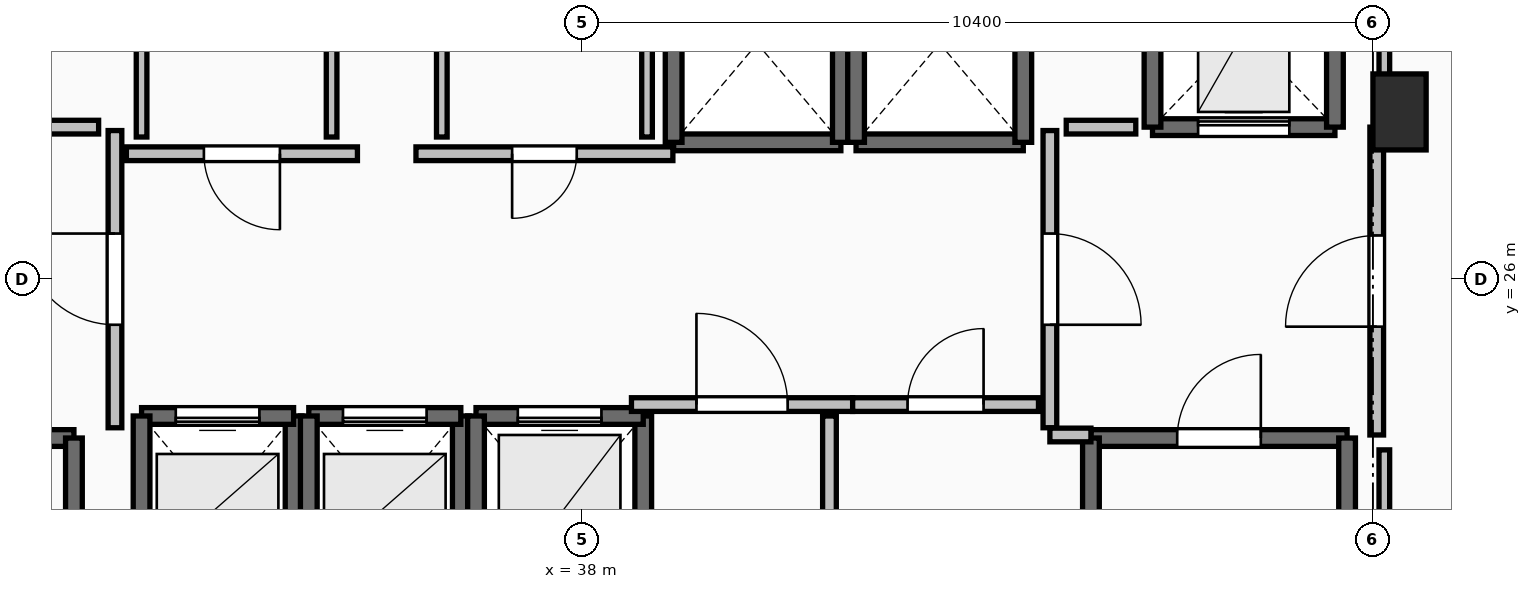
"""IFC4 building model, lengths in metres.
Left out: names, types, materials, properties, quantities, classifications, styles, units other than length and angle.
Written with IfcOpenShell. Run it as: python <this file> out.ifc"""

import sys

from ifc_helpers import new_model, si_unit, direction, frame, frame_2d, origin, origin_2d, place, context, subcontext, project, spatial, rectangle, extrude, element, fill, save


model = new_model("IFC4")
c1 = context("Model", 3, precision=1e-05, world=origin(), true_north=direction((0.0, 1.0)))
c2 = subcontext(c1, "Body", "Model", "MODEL_VIEW")
j1 = project(units=[si_unit("LENGTHUNIT", "METRE"), si_unit("PLANEANGLEUNIT", "RADIAN")], contexts=[c1])
p1 = place(None, origin())
s1 = spatial("IfcSite", under=j1, at=p1, CompositionType="ELEMENT")
p2 = place(p1, origin())
s2 = spatial("IfcBuilding", under=s1, at=p2, CompositionType="ELEMENT")
p3 = place(p2, frame((0.0, 0.0, 189.6)))
s3 = spatial("IfcBuildingStorey", under=s2, at=p3, CompositionType="ELEMENT", Elevation=189.6)
p4 = place(p3, frame((48.75, 28.2, 0.0), z_axis=(0.0, 0.0, 1.0), x_axis=(1.0, 0.0, 0.0)))
e1 = element("IfcColumn", 1, at=p4, inside=s3, PredefinedType="PILASTER", context=c2, shape_type="SweptSolid", body=[
    extrude(rectangle(XDim=0.7, YDim=1.0, at=origin_2d()), origin(), (0.0, 0.0, 1.0), 3.5),
])
p5 = place(p3, frame((27.94, 23.91, 0.0), z_axis=(0.0, 0.0, 1.0), x_axis=(1.0, 0.0, 0.0)))
e2 = element("IfcWall", 2, at=p5, inside=s3, PredefinedType="SOLIDWALL", context=c2, shape_type="SweptSolid", body=[
    extrude(rectangle(XDim=3.37, YDim=0.22, at=frame_2d((1.685, 0.0))), origin(), (0.0, 0.0, 1.0), 3.24),
])
p6 = place(p5, frame((1.135, 0.0, 0.0)))
e3 = element("IfcOpeningElement", 3, at=p6, cuts=e2, PredefinedType="OPENING", context=c2, shape_type="SweptSolid", body=[
    extrude(rectangle(XDim=1.1, YDim=2.15, at=frame_2d((0.55, 1.075))), frame((0.0, 0.125, 0.0), z_axis=(0.0, -1.0, 0.0), x_axis=(1.0, 0.0, 0.0)), (0.0, 0.0, 1.0), 0.25),
])
p7 = place(p3, frame((31.31, 23.91, 0.0), z_axis=(0.0, 0.0, 1.0), x_axis=(0.0, -1.0, 0.0)))
e4 = element("IfcWall", 4, at=p7, inside=s3, PredefinedType="SOLIDWALL", context=c2, shape_type="SweptSolid", body=[
    extrude(rectangle(XDim=7.42, YDim=0.22, at=frame_2d((3.71, 0.0))), origin(), (0.0, 0.0, 1.0), 3.24),
])
p8 = place(p3, frame((44.69, 23.91, 0.0), z_axis=(0.0, 0.0, 1.0), x_axis=(1.0, 0.0, 0.0)))
e5 = element("IfcWall", 5, at=p8, inside=s3, PredefinedType="SOLIDWALL", context=c2, shape_type="SweptSolid", body=[
    extrude(rectangle(XDim=3.37, YDim=0.22, at=frame_2d((1.685, 0.0))), origin(), (0.0, 0.0, 1.0), 3.24),
])
p9 = place(p8, frame((1.135, 0.0, 0.0)))
e6 = element("IfcOpeningElement", 6, at=p9, cuts=e5, PredefinedType="OPENING", context=c2, shape_type="SweptSolid", body=[
    extrude(rectangle(XDim=1.1, YDim=2.15, at=frame_2d((0.55, 1.075))), frame((0.0, 0.125, 0.0), z_axis=(0.0, -1.0, 0.0), x_axis=(1.0, 0.0, 0.0)), (0.0, 0.0, 1.0), 0.25),
])
for number, where, z_axis, x_axis in (
    (7, (48.06, 23.91, 0.0), (0.0, 0.0, 1.0), (0.0, -1.0, 0.0)),
    (8, (44.69, 16.49, 0.0), (0.0, 0.0, 1.0), (0.0, 1.0, 0.0)),
):
    element("IfcWall", number, at=place(p3, frame(where, z_axis=z_axis, x_axis=x_axis)), inside=s3, PredefinedType="SOLIDWALL", context=c2, shape_type="SweptSolid", body=[
        extrude(rectangle(XDim=7.42, YDim=0.22, at=frame_2d((3.71, 0.0))), origin(), (0.0, 0.0, 1.0), 3.24),
    ])
p10 = place(p3, frame((34.2, 21.8, 0.0), z_axis=(0.0, 0.0, 1.0), x_axis=(0.0, 1.0, 0.0)))
e9 = element("IfcWall", 9, at=p10, inside=s3, PredefinedType="SOLIDWALL", context=c2, shape_type="SweptSolid", body=[
    extrude(rectangle(XDim=2.4, YDim=0.22, at=frame_2d((1.2, 0.0))), origin(), (0.0, 0.0, 1.0), 3.24),
])
p11 = place(p3, frame((34.2, 24.2, 0.0), z_axis=(0.0, 0.0, 1.0), x_axis=(-1.0, 0.0, 0.0)))
e10 = element("IfcWall", 10, at=p11, inside=s3, PredefinedType="SOLIDWALL", context=c2, shape_type="SweptSolid", body=[
    extrude(rectangle(XDim=2.0, YDim=0.22, at=frame_2d((1.0, 0.0))), origin(), (0.0, 0.0, 1.0), 3.24),
])
p12 = place(p11, frame((0.45, 0.0, 0.0)))
e11 = element("IfcOpeningElement", 11, at=p12, cuts=e10, PredefinedType="OPENING", context=c2, shape_type="SweptSolid", body=[
    extrude(rectangle(XDim=1.1, YDim=2.2, at=frame_2d((0.55, 1.1))), frame((0.0, 0.125, 0.0), z_axis=(0.0, -1.0, 0.0), x_axis=(1.0, 0.0, 0.0)), (0.0, 0.0, 1.0), 0.25),
])
for number, where, z_axis, x_axis in (
    (12, (32.2, 24.2, 0.0), (0.0, 0.0, 1.0), (0.0, -1.0, 0.0)),
    (13, (36.4, 21.8, 0.0), (0.0, 0.0, 1.0), (0.0, 1.0, 0.0)),
):
    element("IfcWall", number, at=place(p3, frame(where, z_axis=z_axis, x_axis=x_axis)), inside=s3, PredefinedType="SOLIDWALL", context=c2, shape_type="SweptSolid", body=[
        extrude(rectangle(XDim=2.4, YDim=0.22, at=frame_2d((1.2, 0.0))), origin(), (0.0, 0.0, 1.0), 3.24),
    ])
p13 = place(p3, frame((36.4, 24.2, 0.0), z_axis=(0.0, 0.0, 1.0), x_axis=(-1.0, 0.0, 0.0)))
e14 = element("IfcWall", 14, at=p13, inside=s3, PredefinedType="SOLIDWALL", context=c2, shape_type="SweptSolid", body=[
    extrude(rectangle(XDim=2.0, YDim=0.22, at=frame_2d((1.0, 0.0))), origin(), (0.0, 0.0, 1.0), 3.24),
])
p14 = place(p13, frame((0.45, 0.0, 0.0)))
e15 = element("IfcOpeningElement", 15, at=p14, cuts=e14, PredefinedType="OPENING", context=c2, shape_type="SweptSolid", body=[
    extrude(rectangle(XDim=1.1, YDim=2.2, at=frame_2d((0.55, 1.1))), frame((0.0, 0.125, 0.0), z_axis=(0.0, -1.0, 0.0), x_axis=(1.0, 0.0, 0.0)), (0.0, 0.0, 1.0), 0.25),
])
p15 = place(p3, frame((34.4, 24.2, 0.0), z_axis=(0.0, 0.0, 1.0), x_axis=(0.0, -1.0, 0.0)))
e16 = element("IfcWall", 16, at=p15, inside=s3, PredefinedType="SOLIDWALL", context=c2, shape_type="SweptSolid", body=[
    extrude(rectangle(XDim=2.4, YDim=0.22, at=frame_2d((1.2, 0.0))), origin(), (0.0, 0.0, 1.0), 3.24),
])
p16 = place(p3, frame((38.8, 21.6, 0.0), z_axis=(0.0, 0.0, 1.0), x_axis=(0.0, 1.0, 0.0)))
e17 = element("IfcWall", 17, at=p16, inside=s3, PredefinedType="SOLIDWALL", context=c2, shape_type="SweptSolid", body=[
    extrude(rectangle(XDim=2.6, YDim=0.22, at=frame_2d((1.3, 0.0))), origin(), (0.0, 0.0, 1.0), 3.24),
])
p17 = place(p3, frame((38.8, 24.2, 0.0), z_axis=(0.0, 0.0, 1.0), x_axis=(-1.0, 0.0, 0.0)))
e18 = element("IfcWall", 18, at=p17, inside=s3, PredefinedType="SOLIDWALL", context=c2, shape_type="SweptSolid", body=[
    extrude(rectangle(XDim=2.2, YDim=0.22, at=frame_2d((1.1, 0.0))), origin(), (0.0, 0.0, 1.0), 3.24),
])
p18 = place(p17, frame((0.55, 0.0, 0.0)))
e19 = element("IfcOpeningElement", 19, at=p18, cuts=e18, PredefinedType="OPENING", context=c2, shape_type="SweptSolid", body=[
    extrude(rectangle(XDim=1.1, YDim=2.2, at=frame_2d((0.55, 1.1))), frame((0.0, 0.125, 0.0), z_axis=(0.0, -1.0, 0.0), x_axis=(1.0, 0.0, 0.0)), (0.0, 0.0, 1.0), 0.25),
])
p19 = place(p3, frame((36.6, 24.2, 0.0), z_axis=(0.0, 0.0, 1.0), x_axis=(0.0, -1.0, 0.0)))
e20 = element("IfcWall", 20, at=p19, inside=s3, PredefinedType="SOLIDWALL", context=c2, shape_type="SweptSolid", body=[
    extrude(rectangle(XDim=2.6, YDim=0.22, at=frame_2d((1.3, 0.0))), origin(), (0.0, 0.0, 1.0), 3.24),
])
p20 = place(p3, frame((39.2, 27.8, 0.0), z_axis=(0.0, 0.0, 1.0), x_axis=(1.0, 0.0, 0.0)))
e21 = element("IfcWall", 21, at=p20, inside=s3, PredefinedType="SOLIDWALL", context=c2, shape_type="SweptSolid", body=[
    extrude(rectangle(XDim=2.2, YDim=0.22, at=frame_2d((1.1, 0.0))), origin(), (0.0, 0.0, 1.0), 3.24),
])
for number, where, z_axis, x_axis in (
    (22, (41.4, 27.8, 0.0), (0.0, 0.0, 1.0), (0.0, 1.0, 0.0)),
    (23, (39.2, 30.4, 0.0), (0.0, 0.0, 1.0), (0.0, -1.0, 0.0)),
):
    element("IfcWall", number, at=place(p3, frame(where, z_axis=z_axis, x_axis=x_axis)), inside=s3, PredefinedType="SOLIDWALL", context=c2, shape_type="SweptSolid", body=[
        extrude(rectangle(XDim=2.6, YDim=0.22, at=frame_2d((1.3, 0.0))), origin(), (0.0, 0.0, 1.0), 3.24),
    ])
p21 = place(p3, frame((41.6, 27.8, 0.0), z_axis=(0.0, 0.0, 1.0), x_axis=(1.0, 0.0, 0.0)))
e24 = element("IfcWall", 24, at=p21, inside=s3, PredefinedType="SOLIDWALL", context=c2, shape_type="SweptSolid", body=[
    extrude(rectangle(XDim=2.2, YDim=0.22, at=frame_2d((1.1, 0.0))), origin(), (0.0, 0.0, 1.0), 3.24),
])
for number, where, z_axis, x_axis in (
    (25, (43.8, 27.8, 0.0), (0.0, 0.0, 1.0), (0.0, 1.0, 0.0)),
    (26, (41.6, 30.4, 0.0), (0.0, 0.0, 1.0), (0.0, -1.0, 0.0)),
):
    element("IfcWall", number, at=place(p3, frame(where, z_axis=z_axis, x_axis=x_axis)), inside=s3, PredefinedType="SOLIDWALL", context=c2, shape_type="SweptSolid", body=[
        extrude(rectangle(XDim=2.6, YDim=0.22, at=frame_2d((1.3, 0.0))), origin(), (0.0, 0.0, 1.0), 3.24),
    ])
p22 = place(p3, frame((45.5, 28.0, 0.0), z_axis=(0.0, 0.0, 1.0), x_axis=(1.0, 0.0, 0.0)))
e27 = element("IfcWall", 27, at=p22, inside=s3, PredefinedType="SHEAR", context=c2, shape_type="SweptSolid", body=[
    extrude(rectangle(XDim=2.4, YDim=0.22, at=frame_2d((1.2, 0.0))), origin(), (0.0, 0.0, 1.0), 3.24),
])
p23 = place(p22, frame((0.6, 0.0, 0.0)))
e28 = element("IfcOpeningElement", 28, at=p23, cuts=e27, PredefinedType="OPENING", context=c2, shape_type="SweptSolid", body=[
    extrude(rectangle(XDim=1.2, YDim=2.2, at=frame_2d((0.6, 1.1))), frame((0.0, 0.125, 0.0), z_axis=(0.0, -1.0, 0.0), x_axis=(1.0, 0.0, 0.0)), (0.0, 0.0, 1.0), 0.25),
])
for number, where, z_axis, x_axis in (
    (29, (47.9, 28.0, 0.0), (0.0, 0.0, 1.0), (0.0, 1.0, 0.0)),
    (30, (45.5, 30.5, 0.0), (0.0, 0.0, 1.0), (0.0, -1.0, 0.0)),
):
    element("IfcWall", number, at=place(p3, frame(where, z_axis=z_axis, x_axis=x_axis)), inside=s3, PredefinedType="SHEAR", context=c2, shape_type="SweptSolid", body=[
        extrude(rectangle(XDim=2.5, YDim=0.22, at=frame_2d((1.25, 0.0))), origin(), (0.0, 0.0, 1.0), 3.24),
    ])
p24 = place(p3, frame((31.85, 24.045, 0.0), z_axis=(0.0, 0.0, 1.0), x_axis=(0.0, 1.0, 0.0)))
e31 = element("IfcWall", 31, at=p24, inside=s3, PredefinedType="PARTITIONING", context=c2, shape_type="SweptSolid", body=[
    extrude(rectangle(XDim=3.91, YDim=0.18, at=frame_2d((1.955, 0.0))), origin(), (0.0, 0.0, 1.0), 3.24),
])
p25 = place(p24, frame((1.355, 0.0, 0.0)))
e32 = element("IfcOpeningElement", 32, at=p25, cuts=e31, PredefinedType="OPENING", context=c2, shape_type="SweptSolid", body=[
    extrude(rectangle(XDim=1.2, YDim=2.15, at=frame_2d((0.6, 1.075))), frame((0.0, 0.105, 0.0), z_axis=(0.0, -1.0, 0.0), x_axis=(1.0, 0.0, 0.0)), (0.0, 0.0, 1.0), 0.21),
])
p26 = place(p3, frame((44.15, 27.955, 0.0), z_axis=(0.0, 0.0, 1.0), x_axis=(0.0, -1.0, 0.0)))
e33 = element("IfcWall", 33, at=p26, inside=s3, PredefinedType="PARTITIONING", context=c2, shape_type="SweptSolid", body=[
    extrude(rectangle(XDim=3.91, YDim=0.18, at=frame_2d((1.955, 0.0))), origin(), (0.0, 0.0, 1.0), 3.24),
])
p27 = place(p26, frame((1.355, 0.0, 0.0)))
e34 = element("IfcOpeningElement", 34, at=p27, cuts=e33, PredefinedType="OPENING", context=c2, shape_type="SweptSolid", body=[
    extrude(rectangle(XDim=1.2, YDim=2.15, at=frame_2d((0.6, 1.075))), frame((0.0, 0.105, 0.0), z_axis=(0.0, -1.0, 0.0), x_axis=(1.0, 0.0, 0.0)), (0.0, 0.0, 1.0), 0.21),
])
p28 = place(p3, frame((44.15, 23.95, 0.0), z_axis=(0.0, 0.0, 1.0), x_axis=(1.0, 0.0, 0.0)))
e35 = element("IfcWall", 35, at=p28, inside=s3, PredefinedType="PARTITIONING", context=c2, shape_type="SweptSolid", body=[
    extrude(rectangle(XDim=0.54, YDim=0.18, at=frame_2d((0.27, 0.0))), origin(), (0.0, 0.0, 1.0), 3.24),
])
p29 = place(p3, frame((48.45, 23.95, 0.0), z_axis=(0.0, 0.0, 1.0), x_axis=(0.0, 1.0, 0.0)))
e36 = element("IfcWall", 36, at=p29, inside=s3, PredefinedType="PARTITIONING", context=c2, shape_type="SweptSolid", body=[
    extrude(rectangle(XDim=4.05, YDim=0.18, at=frame_2d((2.025, 0.0))), origin(), (0.0, 0.0, 1.0), 3.24),
])
p30 = place(p29, frame((1.425, 0.0, 0.0)))
e37 = element("IfcOpeningElement", 37, at=p30, cuts=e36, PredefinedType="OPENING", context=c2, shape_type="SweptSolid", body=[
    extrude(rectangle(XDim=1.2, YDim=2.15, at=frame_2d((0.6, 1.075))), frame((0.0, 0.105, 0.0), z_axis=(0.0, -1.0, 0.0), x_axis=(1.0, 0.0, 0.0)), (0.0, 0.0, 1.0), 0.21),
])
p31 = place(p3, frame((38.645, 24.35, 0.0), z_axis=(0.0, 0.0, 1.0), x_axis=(1.0, 0.0, 0.0)))
e38 = element("IfcWall", 38, at=p31, inside=s3, PredefinedType="PARTITIONING", context=c2, shape_type="SweptSolid", body=[
    extrude(rectangle(XDim=2.91, YDim=0.18, at=frame_2d((1.455, 0.0))), origin(), (0.0, 0.0, 1.0), 3.24),
])
p32 = place(p31, frame((0.855, 0.0, 0.0)))
e39 = element("IfcOpeningElement", 39, at=p32, cuts=e38, PredefinedType="OPENING", context=c2, shape_type="SweptSolid", body=[
    extrude(rectangle(XDim=1.2, YDim=2.15, at=frame_2d((0.6, 1.075))), frame((0.0, 0.105, 0.0), z_axis=(0.0, -1.0, 0.0), x_axis=(1.0, 0.0, 0.0)), (0.0, 0.0, 1.0), 0.21),
])
p33 = place(p3, frame((41.555, 24.35, 0.0), z_axis=(0.0, 0.0, 1.0), x_axis=(1.0, 0.0, 0.0)))
e40 = element("IfcWall", 40, at=p33, inside=s3, PredefinedType="PARTITIONING", context=c2, shape_type="SweptSolid", body=[
    extrude(rectangle(XDim=2.445, YDim=0.18, at=frame_2d((1.223, 0.0))), origin(), (0.0, 0.0, 1.0), 3.24),
])
p34 = place(p33, frame((0.722, 0.0, 0.0)))
e41 = element("IfcOpeningElement", 41, at=p34, cuts=e40, PredefinedType="OPENING", context=c2, shape_type="SweptSolid", body=[
    extrude(rectangle(XDim=1.0, YDim=2.15, at=frame_2d((0.5, 1.075))), frame((0.0, 0.105, 0.0), z_axis=(0.0, -1.0, 0.0), x_axis=(1.0, 0.0, 0.0)), (0.0, 0.0, 1.0), 0.21),
])
p35 = place(p3, frame((35.04, 27.65, 0.0), z_axis=(0.0, 0.0, 1.0), x_axis=(-1.0, 0.0, 0.0)))
e42 = element("IfcWall", 42, at=p35, inside=s3, PredefinedType="PARTITIONING", context=c2, shape_type="SweptSolid", body=[
    extrude(rectangle(XDim=3.04, YDim=0.18, at=frame_2d((1.52, 0.0))), origin(), (0.0, 0.0, 1.0), 3.24),
])
p36 = place(p35, frame((1.02, 0.0, 0.0)))
e43 = element("IfcOpeningElement", 43, at=p36, cuts=e42, PredefinedType="OPENING", context=c2, shape_type="SweptSolid", body=[
    extrude(rectangle(XDim=1.0, YDim=2.15, at=frame_2d((0.5, 1.075))), frame((0.0, 0.105, 0.0), z_axis=(0.0, -1.0, 0.0), x_axis=(1.0, 0.0, 0.0)), (0.0, 0.0, 1.0), 0.21),
])
p37 = place(p3, frame((39.19, 27.65, 0.0), z_axis=(0.0, 0.0, 1.0), x_axis=(-1.0, 0.0, 0.0)))
e44 = element("IfcWall", 44, at=p37, inside=s3, PredefinedType="PARTITIONING", context=c2, shape_type="SweptSolid", body=[
    extrude(rectangle(XDim=3.38, YDim=0.18, at=frame_2d((1.69, 0.0))), origin(), (0.0, 0.0, 1.0), 3.24),
])
p38 = place(p37, frame((1.265, 0.0, 0.0)))
e45 = element("IfcOpeningElement", 45, at=p38, cuts=e44, PredefinedType="OPENING", context=c2, shape_type="SweptSolid", body=[
    extrude(rectangle(XDim=0.85, YDim=2.1, at=frame_2d((0.425, 1.05))), frame((0.0, 0.105, 0.0), z_axis=(0.0, -1.0, 0.0), x_axis=(1.0, 0.0, 0.0)), (0.0, 0.0, 1.0), 0.21),
])
p39 = place(p3, frame((41.25, 20.305, 0.0), z_axis=(0.0, 0.0, 1.0), x_axis=(0.0, 1.0, 0.0)))
e46 = element("IfcWall", 46, at=p39, inside=s3, PredefinedType="PARTITIONING", context=c2, shape_type="SweptSolid", body=[
    extrude(rectangle(XDim=3.895, YDim=0.18, at=frame_2d((1.948, 0.0))), origin(), (0.0, 0.0, 1.0), 3.24),
])
p40 = place(p39, frame((1.448, 0.0, 0.0)))
e47 = element("IfcOpeningElement", 47, at=p40, cuts=e46, PredefinedType="OPENING", context=c2, shape_type="SweptSolid", body=[
    extrude(rectangle(XDim=1.0, YDim=2.15, at=frame_2d((0.5, 1.075))), frame((0.0, 0.105, 0.0), z_axis=(0.0, -1.0, 0.0), x_axis=(1.0, 0.0, 0.0)), (0.0, 0.0, 1.0), 0.21),
])
for number, where, z_axis, x_axis in (
    (48, (31.635, 28.0, 0.0), (0.0, 0.0, 1.0), (-1.0, 0.0, 0.0)),
    (49, (45.28, 28.0, 0.0), (0.0, 0.0, 1.0), (-1.0, 0.0, 0.0)),
):
    element("IfcWall", number, at=place(p3, frame(where, z_axis=z_axis, x_axis=x_axis)), inside=s3, PredefinedType="PARTITIONING", context=c2, shape_type="SweptSolid", body=[
        extrude(rectangle(XDim=0.915, YDim=0.18, at=frame_2d((0.458, 0.0))), origin(), (0.0, 0.0, 1.0), 3.24),
    ])
for number, where, z_axis, x_axis in (
    (50, (32.2, 30.26, 0.0), (0.0, 0.0, 1.0), (0.0, -1.0, 0.0)),
    (51, (34.7, 27.87, 0.0), (0.0, 0.0, 1.0), (0.0, 1.0, 0.0)),
    (52, (36.15, 30.26, 0.0), (0.0, 0.0, 1.0), (0.0, -1.0, 0.0)),
    (53, (38.85, 27.87, 0.0), (0.0, 0.0, 1.0), (0.0, 1.0, 0.0)),
):
    element("IfcWall", number, at=place(p3, frame(where, z_axis=z_axis, x_axis=x_axis)), inside=s3, PredefinedType="PARTITIONING", context=c2, shape_type="SweptSolid", body=[
        extrude(rectangle(XDim=2.39, YDim=0.14, at=frame_2d((1.195, 0.0))), origin(), (0.0, 0.0, 1.0), 3.24),
    ])
p41 = place(p3, frame((48.55, 28.196, 0.0), z_axis=(0.0, 0.0, 1.0), x_axis=(0.0, 1.0, 0.0)))
e54 = element("IfcWall", 54, at=p41, inside=s3, PredefinedType="PARTITIONING", context=c2, shape_type="SweptSolid", body=[
    extrude(rectangle(XDim=5.254, YDim=0.14, at=frame_2d((2.627, 0.0))), origin(), (0.0, 0.0, 1.0), 2.432),
])
p42 = place(p3, frame((48.55, 16.24, 0.0), z_axis=(0.0, 0.0, 1.0), x_axis=(0.0, 1.0, 0.0)))
e55 = element("IfcWall", 55, at=p42, inside=s3, PredefinedType="PARTITIONING", context=c2, shape_type="SweptSolid", body=[
    extrude(rectangle(XDim=7.514, YDim=0.14, at=frame_2d((3.757, 0.0))), origin(), (0.0, 0.0, 1.0), 2.432),
])
p43 = place(p9, origin())
e56 = element("IfcDoor", 56, at=p43, inside=s3, OperationType="SINGLE_SWING_RIGHT", PredefinedType="DOOR", context=c2, shape_type="SweptSolid", body=[
    extrude(rectangle(XDim=1.1, YDim=2.15, at=frame_2d((0.55, 1.075))), frame((0.0, 0.025, 0.0), z_axis=(0.0, -1.0, 0.0), x_axis=(1.0, 0.0, 0.0)), (0.0, 0.0, 1.0), 0.05),
])
fill(e6, e56)
p44 = place(p12, origin())
e57 = element("IfcDoor", 57, at=p44, inside=s3, OperationType="SLIDING_TO_LEFT", PredefinedType="DOOR", context=c2, shape_type="SweptSolid", body=[
    extrude(rectangle(XDim=1.1, YDim=2.2, at=frame_2d((0.55, 1.1))), frame((0.0, 0.025, 0.0), z_axis=(0.0, -1.0, 0.0), x_axis=(1.0, 0.0, 0.0)), (0.0, 0.0, 1.0), 0.05),
])
fill(e11, e57)
p45 = place(p14, origin())
e58 = element("IfcDoor", 58, at=p45, inside=s3, OperationType="SLIDING_TO_LEFT", PredefinedType="DOOR", context=c2, shape_type="SweptSolid", body=[
    extrude(rectangle(XDim=1.1, YDim=2.2, at=frame_2d((0.55, 1.1))), frame((0.0, 0.025, 0.0), z_axis=(0.0, -1.0, 0.0), x_axis=(1.0, 0.0, 0.0)), (0.0, 0.0, 1.0), 0.05),
])
fill(e15, e58)
p46 = place(p18, origin())
e59 = element("IfcDoor", 59, at=p46, inside=s3, OperationType="SLIDING_TO_LEFT", PredefinedType="DOOR", context=c2, shape_type="SweptSolid", body=[
    extrude(rectangle(XDim=1.1, YDim=2.2, at=frame_2d((0.55, 1.1))), frame((0.0, 0.025, 0.0), z_axis=(0.0, -1.0, 0.0), x_axis=(1.0, 0.0, 0.0)), (0.0, 0.0, 1.0), 0.05),
])
fill(e19, e59)
p47 = place(p23, origin())
e60 = element("IfcDoor", 60, at=p47, inside=s3, OperationType="SLIDING_TO_LEFT", PredefinedType="DOOR", context=c2, shape_type="SweptSolid", body=[
    extrude(rectangle(XDim=1.2, YDim=2.2, at=frame_2d((0.6, 1.1))), frame((0.0, 0.025, 0.0), z_axis=(0.0, -1.0, 0.0), x_axis=(1.0, 0.0, 0.0)), (0.0, 0.0, 1.0), 0.05),
])
fill(e28, e60)
p48 = place(p25, origin())
e61 = element("IfcDoor", 61, at=p48, inside=s3, OperationType="SINGLE_SWING_RIGHT", PredefinedType="DOOR", context=c2, shape_type="SweptSolid", body=[
    extrude(rectangle(XDim=1.2, YDim=2.15, at=frame_2d((0.6, 1.075))), frame((0.0, 0.025, 0.0), z_axis=(0.0, -1.0, 0.0), x_axis=(1.0, 0.0, 0.0)), (0.0, 0.0, 1.0), 0.05),
])
fill(e32, e61)
p49 = place(p27, origin())
e62 = element("IfcDoor", 62, at=p49, inside=s3, OperationType="SINGLE_SWING_RIGHT", PredefinedType="DOOR", context=c2, shape_type="SweptSolid", body=[
    extrude(rectangle(XDim=1.2, YDim=2.15, at=frame_2d((0.6, 1.075))), frame((0.0, 0.025, 0.0), z_axis=(0.0, -1.0, 0.0), x_axis=(1.0, 0.0, 0.0)), (0.0, 0.0, 1.0), 0.05),
])
fill(e34, e62)
p50 = place(p30, origin())
e63 = element("IfcDoor", 63, at=p50, inside=s3, OperationType="SINGLE_SWING_LEFT", PredefinedType="DOOR", context=c2, shape_type="SweptSolid", body=[
    extrude(rectangle(XDim=1.2, YDim=2.15, at=frame_2d((0.6, 1.075))), frame((0.0, 0.025, 0.0), z_axis=(0.0, -1.0, 0.0), x_axis=(1.0, 0.0, 0.0)), (0.0, 0.0, 1.0), 0.05),
])
fill(e37, e63)
p51 = place(p32, origin())
e64 = element("IfcDoor", 64, at=p51, inside=s3, OperationType="SINGLE_SWING_LEFT", PredefinedType="DOOR", context=c2, shape_type="SweptSolid", body=[
    extrude(rectangle(XDim=1.2, YDim=2.15, at=frame_2d((0.6, 1.075))), frame((0.0, 0.025, 0.0), z_axis=(0.0, -1.0, 0.0), x_axis=(1.0, 0.0, 0.0)), (0.0, 0.0, 1.0), 0.05),
])
fill(e39, e64)
p52 = place(p34, origin())
e65 = element("IfcDoor", 65, at=p52, inside=s3, OperationType="SINGLE_SWING_RIGHT", PredefinedType="DOOR", context=c2, shape_type="SweptSolid", body=[
    extrude(rectangle(XDim=1.0, YDim=2.15, at=frame_2d((0.5, 1.075))), frame((0.0, 0.025, 0.0), z_axis=(0.0, -1.0, 0.0), x_axis=(1.0, 0.0, 0.0)), (0.0, 0.0, 1.0), 0.05),
])
fill(e41, e65)
p53 = place(p36, origin())
e66 = element("IfcDoor", 66, at=p53, inside=s3, OperationType="SINGLE_SWING_LEFT", PredefinedType="DOOR", context=c2, shape_type="SweptSolid", body=[
    extrude(rectangle(XDim=1.0, YDim=2.15, at=frame_2d((0.5, 1.075))), frame((0.0, 0.025, 0.0), z_axis=(0.0, -1.0, 0.0), x_axis=(1.0, 0.0, 0.0)), (0.0, 0.0, 1.0), 0.05),
])
fill(e43, e66)
p54 = place(p38, origin())
e67 = element("IfcDoor", 67, at=p54, inside=s3, OperationType="SINGLE_SWING_RIGHT", PredefinedType="DOOR", context=c2, shape_type="SweptSolid", body=[
    extrude(rectangle(XDim=0.85, YDim=2.1, at=frame_2d((0.425, 1.05))), frame((0.0, 0.025, 0.0), z_axis=(0.0, -1.0, 0.0), x_axis=(1.0, 0.0, 0.0)), (0.0, 0.0, 1.0), 0.05),
])
fill(e45, e67)
save(model, sys.argv[1])
